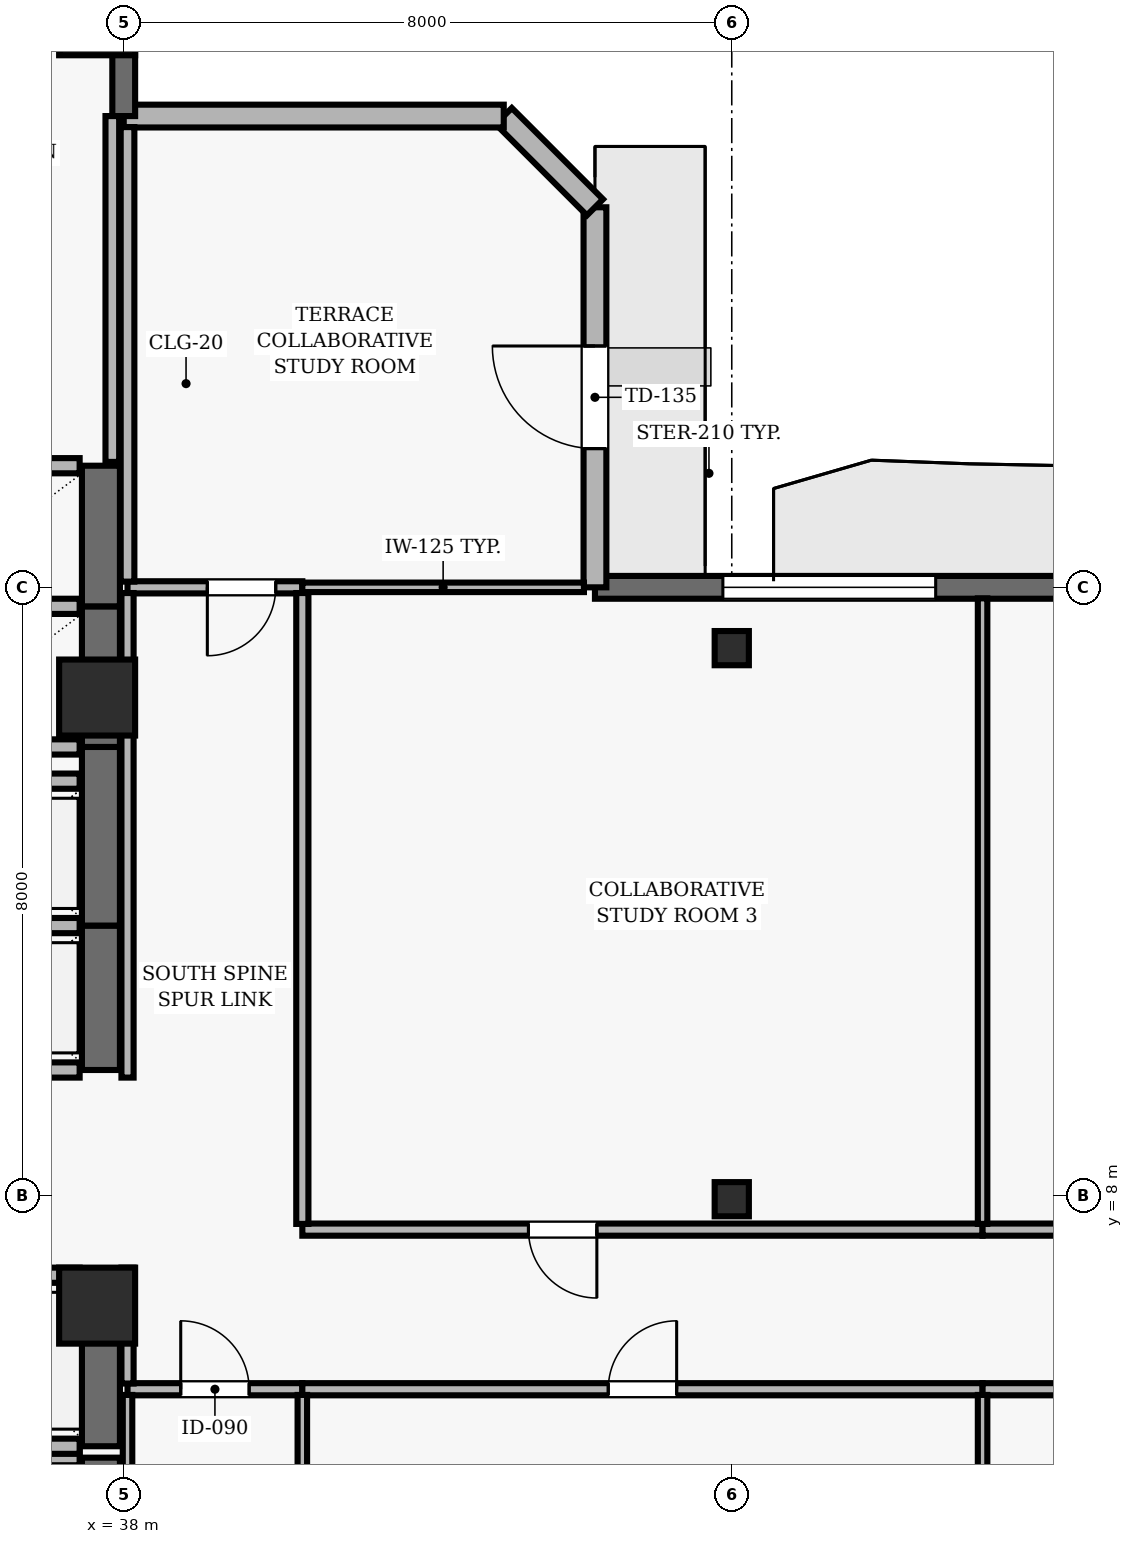
"""IFC4 building model, lengths in metres.
Left out: names, types, materials, properties, quantities, classifications, styles, units other than length and angle.
Written with IfcOpenShell. Run it as: python <this file> out.ifc"""

import sys

from ifc_helpers import new_model, si_unit, direction, frame, frame_2d, origin, origin_2d, place, context, subcontext, project, spatial, rectangle, hollow_rectangle, extrude, element, fill, save


model = new_model("IFC4")
c1 = context("Model", 3, precision=1e-05, world=origin(), true_north=direction((0.0, 1.0)))
c2 = subcontext(c1, "Body", "Model", "MODEL_VIEW")
j1 = project(units=[si_unit("LENGTHUNIT", "METRE"), si_unit("PLANEANGLEUNIT", "RADIAN")], contexts=[c1])
p1 = place(None, origin())
s1 = spatial("IfcSite", under=j1, at=p1, CompositionType="ELEMENT")
p2 = place(p1, origin())
s2 = spatial("IfcBuilding", under=s1, at=p2, CompositionType="ELEMENT")
p3 = place(p2, frame((0.0, 0.0, 214.8)))
s3 = spatial("IfcBuildingStorey", under=s2, at=p3, CompositionType="ELEMENT", Elevation=214.8)
for number, where, z_axis, x_axis in (
    (1, (37.65, 6.55, 0.0), (0.0, 0.0, 1.0), (1.0, 0.0, 0.0)),
    (2, (37.65, 14.55, 0.0), (0.0, 0.0, 1.0), (1.0, 0.0, 0.0)),
    (3, (37.65, 23.5, 0.0), (0.0, 0.0, 1.0), (1.0, 0.0, 0.0)),
):
    element("IfcColumn", number, at=place(p3, frame(where, z_axis=z_axis, x_axis=x_axis)), inside=s3, PredefinedType="COLUMN", context=c2, shape_type="SweptSolid", body=[
        extrude(rectangle(XDim=1.0, YDim=1.0, at=origin_2d()), origin(), (0.0, 0.0, 1.0), 3.9),
    ])
for number, where, z_axis, x_axis in (
    (4, (46.0, 7.95, 0.0), (0.0, 0.0, 1.0), (1.0, 0.0, 0.0)),
    (5, (46.0, 15.2, 0.0), (0.0, 0.0, 1.0), (1.0, 0.0, 0.0)),
):
    element("IfcColumn", number, at=place(p3, frame(where, z_axis=z_axis, x_axis=x_axis)), inside=s3, PredefinedType="COLUMN", context=c2, shape_type="SweptSolid", body=[
        extrude(hollow_rectangle(XDim=0.45, YDim=0.45, WallThickness=0.02, at=origin_2d()), origin(), (0.0, 0.0, 1.0), 3.9),
    ])
p4 = place(p3, frame((62.7, 16.0, 0.0), z_axis=(0.0, 0.0, 1.0), x_axis=(-1.0, 0.0, 0.0)))
e6 = element("IfcWall", 6, at=p4, inside=s3, PredefinedType="SOLIDWALL", context=c2, shape_type="SweptSolid", body=[
    extrude(rectangle(XDim=18.5, YDim=0.3, at=frame_2d((9.25, 0.0))), origin(), (0.0, 0.0, 1.0), 3.69),
])
p5 = place(p4, frame((7.925, 0.0, 0.0)))
e7 = element("IfcOpeningElement", 7, at=p5, cuts=e6, PredefinedType="OPENING", context=c2, shape_type="SweptSolid", body=[
    extrude(rectangle(XDim=1.0, YDim=2.2, at=frame_2d((0.5, 1.1))), frame((0.0, 0.16, 0.0), z_axis=(0.0, -1.0, 0.0), x_axis=(1.0, 0.0, 0.0)), (0.0, 0.0, 1.0), 0.32),
])
p6 = place(p4, frame((1.233, 0.0, 0.9)))
e8 = element("IfcOpeningElement", 8, at=p6, cuts=e6, PredefinedType="OPENING", context=c2, shape_type="SweptSolid", body=[
    extrude(rectangle(XDim=2.8, YDim=1.8, at=frame_2d((1.4, 0.9))), frame((0.0, 0.16, 0.0), z_axis=(0.0, -1.0, 0.0), x_axis=(1.0, 0.0, 0.0)), (0.0, 0.0, 1.0), 0.32),
])
p7 = place(p4, frame((14.017, 0.0, 0.9)))
e9 = element("IfcOpeningElement", 9, at=p7, cuts=e6, PredefinedType="OPENING", context=c2, shape_type="SweptSolid", body=[
    extrude(rectangle(XDim=2.8, YDim=1.8, at=frame_2d((1.4, 0.9))), frame((0.0, 0.16, 0.0), z_axis=(0.0, -1.0, 0.0), x_axis=(1.0, 0.0, 0.0)), (0.0, 0.0, 1.0), 0.32),
])
p8 = place(p3, frame((44.2, 16.0, 0.0), z_axis=(0.0, 0.0, 1.0), x_axis=(0.0, 1.0, 0.0)))
e10 = element("IfcWall", 10, at=p8, inside=s3, PredefinedType="SOLIDWALL", context=c2, shape_type="SweptSolid", body=[
    extrude(rectangle(XDim=5.0, YDim=0.3, at=frame_2d((2.5, 0.0))), origin(), (0.0, 0.0, 1.0), 3.69),
])
p9 = place(p8, frame((1.825, 0.0, 0.0)))
e11 = element("IfcOpeningElement", 11, at=p9, cuts=e10, PredefinedType="OPENING", context=c2, shape_type="SweptSolid", body=[
    extrude(rectangle(XDim=1.35, YDim=2.2, at=frame_2d((0.675, 1.1))), frame((0.0, 0.16, 0.0), z_axis=(0.0, -1.0, 0.0), x_axis=(1.0, 0.0, 0.0)), (0.0, 0.0, 1.0), 0.32),
])
p10 = place(p3, frame((44.2, 21.0, 0.0), z_axis=(0.0, 0.0, 1.0), x_axis=(-0.707106781187, 0.707106781187, 0.0)))
e12 = element("IfcWall", 12, at=p10, inside=s3, PredefinedType="SOLIDWALL", context=c2, shape_type="SweptSolid", body=[
    extrude(rectangle(XDim=1.697, YDim=0.3, at=frame_2d((0.849, 0.0))), origin(), (0.0, 0.0, 1.0), 3.69),
])
p11 = place(p3, frame((43.0, 22.2, 0.0), z_axis=(0.0, 0.0, 1.0), x_axis=(-1.0, 0.0, 0.0)))
e13 = element("IfcWall", 13, at=p11, inside=s3, PredefinedType="SOLIDWALL", context=c2, shape_type="SweptSolid", body=[
    extrude(rectangle(XDim=5.0, YDim=0.3, at=frame_2d((2.5, 0.0))), origin(), (0.0, 0.0, 1.0), 3.69),
])
p12 = place(p3, frame((38.0, 22.2, 0.0), z_axis=(0.0, 0.0, 1.0), x_axis=(0.0, 1.0, 0.0)))
e14 = element("IfcWall", 14, at=p12, inside=s3, PredefinedType="SOLIDWALL", context=c2, shape_type="SweptSolid", body=[
    extrude(rectangle(XDim=18.5, YDim=0.3, at=frame_2d((9.25, 0.0))), origin(), (0.0, 0.0, 1.0), 3.69),
])
p13 = place(p12, frame((10.191, 0.0, 0.0)))
e15 = element("IfcOpeningElement", 15, at=p13, cuts=e14, PredefinedType="OPENING", context=c2, shape_type="SweptSolid", body=[
    extrude(rectangle(XDim=1.0, YDim=2.2, at=frame_2d((0.5, 1.1))), frame((0.0, 0.16, 0.0), z_axis=(0.0, -1.0, 0.0), x_axis=(1.0, 0.0, 0.0)), (0.0, 0.0, 1.0), 0.32),
])
p14 = place(p12, frame((14.817, 0.0, 0.9)))
e16 = element("IfcOpeningElement", 16, at=p14, cuts=e14, PredefinedType="OPENING", context=c2, shape_type="SweptSolid", body=[
    extrude(rectangle(XDim=1.2, YDim=1.6, at=frame_2d((0.6, 0.8))), frame((0.0, 0.16, 0.0), z_axis=(0.0, -1.0, 0.0), x_axis=(1.0, 0.0, 0.0)), (0.0, 0.0, 1.0), 0.32),
])
p15 = place(p3, frame((37.7, 2.45, 0.0), z_axis=(0.0, 0.0, 1.0), x_axis=(0.0, 1.0, 0.0)))
e17 = element("IfcWall", 17, at=p15, inside=s3, PredefinedType="SHEAR", context=c2, shape_type="SweptSolid", body=[
    extrude(rectangle(XDim=2.1, YDim=0.5, at=frame_2d((1.05, 0.0))), origin(), (0.0, 0.0, 1.0), 3.69),
])
p16 = place(p3, frame((37.42, 4.55, 0.0), z_axis=(0.0, 0.0, 1.0), x_axis=(-1.0, 0.0, 0.0)))
e18 = element("IfcWall", 18, at=p16, inside=s3, PredefinedType="SOLIDWALL", context=c2, shape_type="SweptSolid", body=[
    extrude(rectangle(XDim=2.14, YDim=0.2, at=frame_2d((1.07, 0.0))), origin(), (0.0, 0.0, 1.0), 3.69),
])
p17 = place(p3, frame((37.7, 4.7, 0.0), z_axis=(0.0, 0.0, 1.0), x_axis=(0.0, 1.0, 0.0)))
e19 = element("IfcWall", 19, at=p17, inside=s3, PredefinedType="SHEAR", context=c2, shape_type="SweptSolid", body=[
    extrude(rectangle(XDim=2.25, YDim=0.5, at=frame_2d((1.125, 0.0))), origin(), (0.0, 0.0, 1.0), 3.69),
])
for number, where, z_axis, x_axis in (
    (20, (35.28, 4.7, 0.0), (0.0, 0.0, 1.0), (1.0, 0.0, 0.0)),
    (21, (37.42, 6.95, 0.0), (0.0, 0.0, 1.0), (-1.0, 0.0, 0.0)),
):
    element("IfcWall", number, at=place(p3, frame(where, z_axis=z_axis, x_axis=x_axis)), inside=s3, PredefinedType="SOLIDWALL", context=c2, shape_type="SweptSolid", body=[
        extrude(rectangle(XDim=2.14, YDim=0.2, at=frame_2d((1.07, 0.0))), origin(), (0.0, 0.0, 1.0), 3.69),
    ])
p18 = place(p3, frame((37.7, 9.65, 0.0), z_axis=(0.0, 0.0, 1.0), x_axis=(0.0, 1.0, 0.0)))
e22 = element("IfcWall", 22, at=p18, inside=s3, PredefinedType="SHEAR", context=c2, shape_type="SweptSolid", body=[
    extrude(rectangle(XDim=1.9, YDim=0.5, at=frame_2d((0.95, 0.0))), origin(), (0.0, 0.0, 1.0), 3.69),
])
for number, where, z_axis, x_axis in (
    (23, (35.28, 9.65, 0.0), (0.0, 0.0, 1.0), (1.0, 0.0, 0.0)),
    (24, (37.42, 11.55, 0.0), (0.0, 0.0, 1.0), (-1.0, 0.0, 0.0)),
):
    element("IfcWall", number, at=place(p3, frame(where, z_axis=z_axis, x_axis=x_axis)), inside=s3, PredefinedType="SOLIDWALL", context=c2, shape_type="SweptSolid", body=[
        extrude(rectangle(XDim=2.14, YDim=0.2, at=frame_2d((1.07, 0.0))), origin(), (0.0, 0.0, 1.0), 3.69),
    ])
p19 = place(p3, frame((37.7, 11.55, 0.0), z_axis=(0.0, 0.0, 1.0), x_axis=(0.0, 1.0, 0.0)))
e25 = element("IfcWall", 25, at=p19, inside=s3, PredefinedType="SHEAR", context=c2, shape_type="SweptSolid", body=[
    extrude(rectangle(XDim=2.35, YDim=0.5, at=frame_2d((1.175, 0.0))), origin(), (0.0, 0.0, 1.0), 3.69),
])
p20 = place(p3, frame((37.42, 13.45, 0.0), z_axis=(0.0, 0.0, 1.0), x_axis=(-1.0, 0.0, 0.0)))
e26 = element("IfcWall", 26, at=p20, inside=s3, PredefinedType="SOLIDWALL", context=c2, shape_type="SweptSolid", body=[
    extrude(rectangle(XDim=2.14, YDim=0.2, at=frame_2d((1.07, 0.0))), origin(), (0.0, 0.0, 1.0), 3.69),
])
p21 = place(p3, frame((37.7, 13.9, 0.0), z_axis=(0.0, 0.0, 1.0), x_axis=(0.0, 1.0, 0.0)))
e27 = element("IfcWall", 27, at=p21, inside=s3, PredefinedType="SHEAR", context=c2, shape_type="SweptSolid", body=[
    extrude(rectangle(XDim=1.85, YDim=0.5, at=frame_2d((0.925, 0.0))), origin(), (0.0, 0.0, 1.0), 3.69),
])
for number, where, z_axis, x_axis in (
    (28, (35.28, 13.9, 0.0), (0.0, 0.0, 1.0), (1.0, 0.0, 0.0)),
    (29, (37.42, 15.75, 0.0), (0.0, 0.0, 1.0), (-1.0, 0.0, 0.0)),
):
    element("IfcWall", number, at=place(p3, frame(where, z_axis=z_axis, x_axis=x_axis)), inside=s3, PredefinedType="SOLIDWALL", context=c2, shape_type="SweptSolid", body=[
        extrude(rectangle(XDim=2.14, YDim=0.2, at=frame_2d((1.07, 0.0))), origin(), (0.0, 0.0, 1.0), 3.69),
    ])
p22 = place(p3, frame((37.7, 15.75, 0.0), z_axis=(0.0, 0.0, 1.0), x_axis=(0.0, 1.0, 0.0)))
e30 = element("IfcWall", 30, at=p22, inside=s3, PredefinedType="SHEAR", context=c2, shape_type="SweptSolid", body=[
    extrude(rectangle(XDim=1.85, YDim=0.5, at=frame_2d((0.925, 0.0))), origin(), (0.0, 0.0, 1.0), 3.69),
])
p23 = place(p3, frame((37.42, 17.6, 0.0), z_axis=(0.0, 0.0, 1.0), x_axis=(-1.0, 0.0, 0.0)))
e31 = element("IfcWall", 31, at=p23, inside=s3, PredefinedType="SOLIDWALL", context=c2, shape_type="SweptSolid", body=[
    extrude(rectangle(XDim=2.14, YDim=0.2, at=frame_2d((1.07, 0.0))), origin(), (0.0, 0.0, 1.0), 3.69),
])
p24 = place(p3, frame((38.05, 5.45, 0.0), z_axis=(0.0, 0.0, 1.0), x_axis=(1.0, 0.0, 0.0)))
e32 = element("IfcWall", 32, at=p24, inside=s3, PredefinedType="PARTITIONING", context=c2, shape_type="SweptSolid", body=[
    extrude(rectangle(XDim=2.3, YDim=0.16, at=frame_2d((1.15, 0.0))), origin(), (0.0, 0.0, 1.0), 3.343),
])
p25 = place(p24, frame((0.7, 0.0, 0.0)))
e33 = element("IfcOpeningElement", 33, at=p25, cuts=e32, PredefinedType="OPENING", context=c2, shape_type="SweptSolid", body=[
    extrude(rectangle(XDim=0.9, YDim=2.1, at=frame_2d((0.45, 1.05))), frame((0.0, 0.09, 0.0), z_axis=(0.0, -1.0, 0.0), x_axis=(1.0, 0.0, 0.0)), (0.0, 0.0, 1.0), 0.18),
])
p26 = place(p3, frame((40.35, 5.45, 0.0), z_axis=(0.0, 0.0, 1.0), x_axis=(1.0, 0.0, 0.0)))
e34 = element("IfcWall", 34, at=p26, inside=s3, PredefinedType="PARTITIONING", context=c2, shape_type="SweptSolid", body=[
    extrude(rectangle(XDim=8.95, YDim=0.16, at=frame_2d((4.475, 0.0))), origin(), (0.0, 0.0, 1.0), 3.343),
])
p27 = place(p26, frame((4.025, 0.0, 0.0)))
e35 = element("IfcOpeningElement", 35, at=p27, cuts=e34, PredefinedType="OPENING", context=c2, shape_type="SweptSolid", body=[
    extrude(rectangle(XDim=0.9, YDim=2.1, at=frame_2d((0.45, 1.05))), frame((0.0, 0.09, 0.0), z_axis=(0.0, -1.0, 0.0), x_axis=(1.0, 0.0, 0.0)), (0.0, 0.0, 1.0), 0.18),
])
p28 = place(p3, frame((40.35, 16.0, 0.0), z_axis=(0.0, 0.0, 1.0), x_axis=(-1.0, 0.0, 0.0)))
e36 = element("IfcWall", 36, at=p28, inside=s3, PredefinedType="PARTITIONING", context=c2, shape_type="SweptSolid", body=[
    extrude(rectangle(XDim=2.3, YDim=0.16, at=frame_2d((1.15, 0.0))), origin(), (0.0, 0.0, 1.0), 3.39),
])
p29 = place(p28, frame((0.35, 0.0, 0.0)))
e37 = element("IfcOpeningElement", 37, at=p29, cuts=e36, PredefinedType="OPENING", context=c2, shape_type="SweptSolid", body=[
    extrude(rectangle(XDim=0.9, YDim=2.1, at=frame_2d((0.45, 1.05))), frame((0.0, 0.09, 0.0), z_axis=(0.0, -1.0, 0.0), x_axis=(1.0, 0.0, 0.0)), (0.0, 0.0, 1.0), 0.18),
])
p30 = place(p3, frame((40.35, 16.0, 0.0), z_axis=(0.0, 0.0, 1.0), x_axis=(1.0, 0.0, 0.0)))
e38 = element("IfcWall", 38, at=p30, inside=s3, PredefinedType="PARTITIONING", context=c2, shape_type="SweptSolid", body=[
    extrude(rectangle(XDim=3.705, YDim=0.125, at=frame_2d((1.853, 0.0))), origin(), (0.0, 0.0, 1.0), 3.39),
])
p31 = place(p3, frame((49.3, 5.45, 0.0), z_axis=(0.0, 0.0, 1.0), x_axis=(1.0, 0.0, 0.0)))
e39 = element("IfcWall", 39, at=p31, inside=s3, PredefinedType="PARTITIONING", context=c2, shape_type="SweptSolid", body=[
    extrude(rectangle(XDim=8.5, YDim=0.16, at=frame_2d((4.25, 0.0))), origin(), (0.0, 0.0, 1.0), 3.343),
])
p32 = place(p31, frame((3.8, 0.0, 0.0)))
e40 = element("IfcOpeningElement", 40, at=p32, cuts=e39, PredefinedType="OPENING", context=c2, shape_type="SweptSolid", body=[
    extrude(rectangle(XDim=0.9, YDim=2.1, at=frame_2d((0.45, 1.05))), frame((0.0, 0.09, 0.0), z_axis=(0.0, -1.0, 0.0), x_axis=(1.0, 0.0, 0.0)), (0.0, 0.0, 1.0), 0.18),
])
p33 = place(p3, frame((49.3, 7.55, 0.0), z_axis=(0.0, 0.0, 1.0), x_axis=(-1.0, 0.0, 0.0)))
e41 = element("IfcWall", 41, at=p33, inside=s3, PredefinedType="PARTITIONING", context=c2, shape_type="SweptSolid", body=[
    extrude(rectangle(XDim=8.95, YDim=0.16, at=frame_2d((4.475, 0.0))), origin(), (0.0, 0.0, 1.0), 3.139),
])
p34 = place(p33, frame((5.075, 0.0, 0.0)))
e42 = element("IfcOpeningElement", 42, at=p34, cuts=e41, PredefinedType="OPENING", context=c2, shape_type="SweptSolid", body=[
    extrude(rectangle(XDim=0.9, YDim=2.1, at=frame_2d((0.45, 1.05))), frame((0.0, 0.09, 0.0), z_axis=(0.0, -1.0, 0.0), x_axis=(1.0, 0.0, 0.0)), (0.0, 0.0, 1.0), 0.18),
])
p35 = place(p3, frame((57.8, 7.55, 0.0), z_axis=(0.0, 0.0, 1.0), x_axis=(-1.0, 0.0, 0.0)))
e43 = element("IfcWall", 43, at=p35, inside=s3, PredefinedType="PARTITIONING", context=c2, shape_type="SweptSolid", body=[
    extrude(rectangle(XDim=8.5, YDim=0.16, at=frame_2d((4.25, 0.0))), origin(), (0.0, 0.0, 1.0), 3.139),
])
p36 = place(p35, frame((3.45, 0.0, 0.0)))
e44 = element("IfcOpeningElement", 44, at=p36, cuts=e43, PredefinedType="OPENING", context=c2, shape_type="SweptSolid", body=[
    extrude(rectangle(XDim=0.9, YDim=2.1, at=frame_2d((0.45, 1.05))), frame((0.0, 0.09, 0.0), z_axis=(0.0, -1.0, 0.0), x_axis=(1.0, 0.0, 0.0)), (0.0, 0.0, 1.0), 0.18),
])
p37 = place(p3, frame((37.85, 17.65, 0.0), z_axis=(0.0, 0.0, 1.0), x_axis=(0.0, 1.0, 0.0)))
e45 = element("IfcWall", 45, at=p37, inside=s3, PredefinedType="PARTITIONING", context=c2, shape_type="SweptSolid", body=[
    extrude(rectangle(XDim=4.55, YDim=0.18, at=frame_2d((2.275, 0.0))), origin(), (0.0, 0.0, 1.0), 3.139),
])
p38 = place(p3, frame((38.05, 5.375, 0.0), z_axis=(0.0, 0.0, 1.0), x_axis=(0.0, -1.0, 0.0)))
e46 = element("IfcWall", 46, at=p38, inside=s3, PredefinedType="PARTITIONING", context=c2, shape_type="SweptSolid", body=[
    extrude(rectangle(XDim=5.23, YDim=0.125, at=frame_2d((2.615, 0.0))), origin(), (0.0, 0.0, 1.0), 3.139),
])
p39 = place(p3, frame((38.05, 7.05, 0.0), z_axis=(0.0, 0.0, 1.0), x_axis=(0.0, -1.0, 0.0)))
e47 = element("IfcWall", 47, at=p39, inside=s3, PredefinedType="PARTITIONING", context=c2, shape_type="SweptSolid", body=[
    extrude(rectangle(XDim=1.525, YDim=0.16, at=frame_2d((0.763, 0.0))), origin(), (0.0, 0.0, 1.0), 3.139),
])
p40 = place(p3, frame((38.05, 15.925, 0.0), z_axis=(0.0, 0.0, 1.0), x_axis=(0.0, -1.0, 0.0)))
e48 = element("IfcWall", 48, at=p40, inside=s3, PredefinedType="PARTITIONING", context=c2, shape_type="SweptSolid", body=[
    extrude(rectangle(XDim=6.375, YDim=0.16, at=frame_2d((3.188, 0.0))), origin(), (0.0, 0.0, 1.0), 3.139),
])
p41 = place(p3, frame((38.05, 22.055, 0.0), z_axis=(0.0, 0.0, 1.0), x_axis=(0.0, -1.0, 0.0)))
e49 = element("IfcWall", 49, at=p41, inside=s3, PredefinedType="PARTITIONING", context=c2, shape_type="SweptSolid", body=[
    extrude(rectangle(XDim=5.98, YDim=0.18, at=frame_2d((2.99, 0.0))), origin(), (0.0, 0.0, 1.0), 3.139),
])
p42 = place(p3, frame((40.35, 0.145, 0.0), z_axis=(0.0, 0.0, 1.0), x_axis=(0.0, 1.0, 0.0)))
e50 = element("IfcWall", 50, at=p42, inside=s3, PredefinedType="PARTITIONING", context=c2, shape_type="SweptSolid", body=[
    extrude(rectangle(XDim=5.23, YDim=0.125, at=frame_2d((2.615, 0.0))), origin(), (0.0, 0.0, 1.0), 3.69),
])
p43 = place(p3, frame((40.35, 7.625, 0.0), z_axis=(0.0, 0.0, 1.0), x_axis=(0.0, 1.0, 0.0)))
e51 = element("IfcWall", 51, at=p43, inside=s3, PredefinedType="PARTITIONING", context=c2, shape_type="SweptSolid", body=[
    extrude(rectangle(XDim=8.3, YDim=0.16, at=frame_2d((4.15, 0.0))), origin(), (0.0, 0.0, 1.0), 3.69),
])
p44 = place(p3, frame((49.3, 0.145, 0.0), z_axis=(0.0, 0.0, 1.0), x_axis=(0.0, 1.0, 0.0)))
e52 = element("IfcWall", 52, at=p44, inside=s3, PredefinedType="PARTITIONING", context=c2, shape_type="SweptSolid", body=[
    extrude(rectangle(XDim=5.23, YDim=0.125, at=frame_2d((2.615, 0.0))), origin(), (0.0, 0.0, 1.0), 3.69),
])
p45 = place(p3, frame((49.3, 7.625, 0.0), z_axis=(0.0, 0.0, 1.0), x_axis=(0.0, 1.0, 0.0)))
e53 = element("IfcWall", 53, at=p45, inside=s3, PredefinedType="PARTITIONING", context=c2, shape_type="SweptSolid", body=[
    extrude(rectangle(XDim=8.23, YDim=0.125, at=frame_2d((4.115, 0.0))), origin(), (0.0, 0.0, 1.0), 3.69),
])
p46 = place(p7, origin())
e54 = element("IfcWindow", 54, at=p46, inside=s3, PartitioningType="SINGLE_PANEL", PredefinedType="WINDOW", context=c2, shape_type="SweptSolid", body=[
    extrude(rectangle(XDim=2.8, YDim=1.8, at=frame_2d((1.4, 0.9))), frame((0.0, 0.03, 0.0), z_axis=(0.0, -1.0, 0.0), x_axis=(1.0, 0.0, 0.0)), (0.0, 0.0, 1.0), 0.06),
])
fill(e9, e54)
p47 = place(p9, origin())
e55 = element("IfcDoor", 55, at=p47, inside=s3, OperationType="SINGLE_SWING_RIGHT", PredefinedType="DOOR", context=c2, shape_type="SweptSolid", body=[
    extrude(rectangle(XDim=1.35, YDim=2.2, at=frame_2d((0.675, 1.1))), frame((0.0, 0.025, 0.0), z_axis=(0.0, -1.0, 0.0), x_axis=(1.0, 0.0, 0.0)), (0.0, 0.0, 1.0), 0.05),
])
fill(e11, e55)
p48 = place(p25, origin())
e56 = element("IfcDoor", 56, at=p48, inside=s3, OperationType="SINGLE_SWING_LEFT", PredefinedType="DOOR", context=c2, shape_type="SweptSolid", body=[
    extrude(rectangle(XDim=0.9, YDim=2.1, at=frame_2d((0.45, 1.05))), frame((0.0, 0.025, 0.0), z_axis=(0.0, -1.0, 0.0), x_axis=(1.0, 0.0, 0.0)), (0.0, 0.0, 1.0), 0.05),
])
fill(e33, e56)
p49 = place(p27, origin())
e57 = element("IfcDoor", 57, at=p49, inside=s3, OperationType="SINGLE_SWING_RIGHT", PredefinedType="DOOR", context=c2, shape_type="SweptSolid", body=[
    extrude(rectangle(XDim=0.9, YDim=2.1, at=frame_2d((0.45, 1.05))), frame((0.0, 0.025, 0.0), z_axis=(0.0, -1.0, 0.0), x_axis=(1.0, 0.0, 0.0)), (0.0, 0.0, 1.0), 0.05),
])
fill(e35, e57)
p50 = place(p34, origin())
e58 = element("IfcDoor", 58, at=p50, inside=s3, OperationType="SINGLE_SWING_LEFT", PredefinedType="DOOR", context=c2, shape_type="SweptSolid", body=[
    extrude(rectangle(XDim=0.9, YDim=2.1, at=frame_2d((0.45, 1.05))), frame((0.0, 0.025, 0.0), z_axis=(0.0, -1.0, 0.0), x_axis=(1.0, 0.0, 0.0)), (0.0, 0.0, 1.0), 0.05),
])
fill(e42, e58)
p51 = place(p29, origin())
e59 = element("IfcDoor", 59, at=p51, inside=s3, OperationType="SINGLE_SWING_RIGHT", PredefinedType="DOOR", context=c2, shape_type="SweptSolid", body=[
    extrude(rectangle(XDim=0.9, YDim=2.1, at=frame_2d((0.45, 1.05))), frame((0.0, 0.025, 0.0), z_axis=(0.0, -1.0, 0.0), x_axis=(1.0, 0.0, 0.0)), (0.0, 0.0, 1.0), 0.05),
])
fill(e37, e59)
save(model, sys.argv[1])
